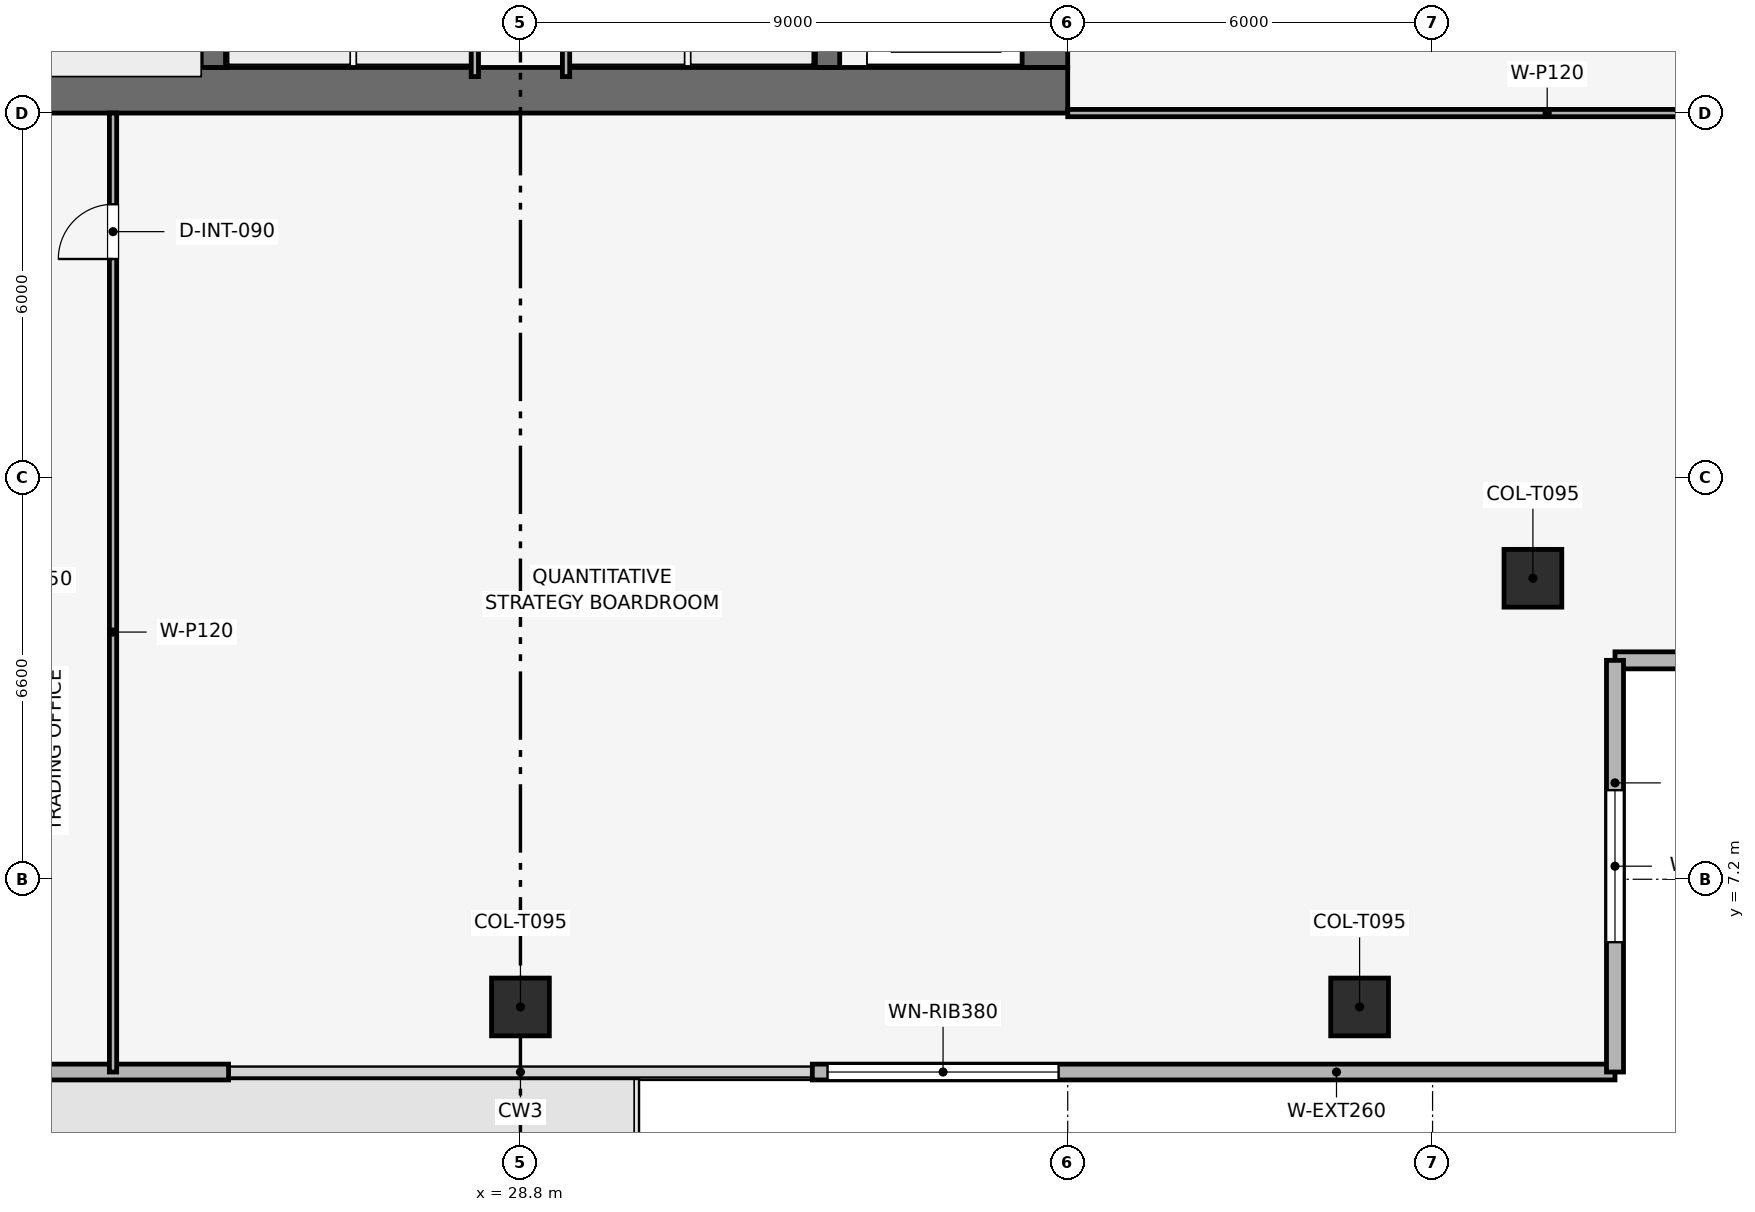
"""IFC4 building model, lengths in metres.
Left out: names, types, materials, properties, quantities, classifications, styles, units other than length and angle.
Written with IfcOpenShell. Run it as: python <this file> out.ifc"""

import sys

from ifc_helpers import new_model, si_unit, direction, frame, frame_2d, origin, origin_2d, place, context, subcontext, project, spatial, rectangle, extrude, element, fill, save


model = new_model("IFC4")
c1 = context("Model", 3, precision=1e-05, world=origin(), true_north=direction((0.0, 1.0)))
c2 = subcontext(c1, "Body", "Model", "MODEL_VIEW")
j1 = project(units=[si_unit("LENGTHUNIT", "METRE"), si_unit("PLANEANGLEUNIT", "RADIAN")], contexts=[c1])
p1 = place(None, origin())
s1 = spatial("IfcSite", under=j1, at=p1, CompositionType="ELEMENT")
p2 = place(p1, origin())
s2 = spatial("IfcBuilding", under=s1, at=p2, CompositionType="ELEMENT")
p3 = place(p2, frame((0.0, 0.0, 254.1)))
s3 = spatial("IfcBuildingStorey", under=s2, at=p3, CompositionType="ELEMENT", Elevation=254.1)
p4 = place(p3, frame((19.8, 20.175, 0.0), z_axis=(0.0, 0.0, 1.0), x_axis=(1.0, 0.0, 0.0)))
e1 = element("IfcWall", 1, at=p4, inside=s3, PredefinedType="SHEAR", context=c2, shape_type="SweptSolid", body=[
    extrude(rectangle(XDim=18.0, YDim=0.75, at=frame_2d((9.0, 0.0))), origin(), (0.0, 0.0, 1.0), 3.75),
])
p5 = place(p3, frame((37.425, 20.55, 0.0), z_axis=(0.0, 0.0, 1.0), x_axis=(0.0, 1.0, 0.0)))
e2 = element("IfcWall", 2, at=p5, inside=s3, PredefinedType="SHEAR", context=c2, shape_type="SweptSolid", body=[
    extrude(rectangle(XDim=16.5, YDim=0.75, at=frame_2d((8.25, 0.0))), origin(), (0.0, 0.0, 1.0), 3.75),
])
p6 = place(p5, frame((4.75, 0.0, 0.0)))
e3 = element("IfcOpeningElement", 3, at=p6, cuts=e2, PredefinedType="OPENING", context=c2, shape_type="SweptSolid", body=[
    extrude(rectangle(XDim=1.1, YDim=2.15, at=frame_2d((0.55, 1.075))), frame((0.0, 0.385, 0.0), z_axis=(0.0, -1.0, 0.0), x_axis=(1.0, 0.0, 0.0)), (0.0, 0.0, 1.0), 0.77),
])
for number, where, z_axis, x_axis in (
    (4, (23.75, 20.55, 0.0), (0.0, 0.0, 1.0), (0.0, 1.0, 0.0)),
    (5, (33.85, 20.55, 0.0), (0.0, 0.0, 1.0), (0.0, 1.0, 0.0)),
):
    element("IfcWall", number, at=place(p3, frame(where, z_axis=z_axis, x_axis=x_axis)), inside=s3, PredefinedType="SHEAR", context=c2, shape_type="SweptSolid", body=[
        extrude(rectangle(XDim=16.5, YDim=0.4, at=frame_2d((8.25, 0.0))), origin(), (0.0, 0.0, 1.0), 3.75),
    ])
for number, where, z_axis, x_axis in (
    (6, (28.8, 5.1, 0.003), (0.0, 0.0, 1.0), (1.0, 0.0, 0.0)),
    (7, (42.6, 5.1, 0.003), (0.0, 0.0, 1.0), (1.0, 0.0, 0.0)),
    (8, (45.45, 12.15, 0.003), (0.0, 0.0, 1.0), (1.0, 0.0, 0.0)),
):
    element("IfcColumn", number, at=place(p3, frame(where, z_axis=z_axis, x_axis=x_axis)), inside=s3, PredefinedType="COLUMN", context=c2, shape_type="SweptSolid", body=[
        extrude(rectangle(XDim=0.95, YDim=0.95, at=origin_2d()), origin(), (0.0, 0.0, 1.0), 3.494),
    ])
p7 = place(p3, frame((46.8, 4.03, 0.0), z_axis=(0.0, 0.0, 1.0), x_axis=(-1.0, 0.0, 0.0)))
e9 = element("IfcWall", 9, at=p7, inside=s3, PredefinedType="SOLIDWALL", context=c2, shape_type="SweptSolid", body=[
    extrude(rectangle(XDim=13.2, YDim=0.26, at=frame_2d((6.6, 0.0))), origin(), (0.0, 0.0, 1.0), 3.5),
])
p8 = place(p7, frame((9.15, 0.0, 0.9)))
e10 = element("IfcOpeningElement", 10, at=p8, cuts=e9, PredefinedType="OPENING", context=c2, shape_type="SweptSolid", body=[
    extrude(rectangle(XDim=3.8, YDim=1.9, at=frame_2d((1.9, 0.95))), frame((0.0, 0.14, 0.0), z_axis=(0.0, -1.0, 0.0), x_axis=(1.0, 0.0, 0.0)), (0.0, 0.0, 1.0), 0.28),
])
p9 = place(p3, frame((24.0, 4.03, 0.0), z_axis=(0.0, 0.0, 1.0), x_axis=(-1.0, 0.0, 0.0)))
e11 = element("IfcWall", 11, at=p9, inside=s3, PredefinedType="SOLIDWALL", context=c2, shape_type="SweptSolid", body=[
    extrude(rectangle(XDim=13.2, YDim=0.26, at=frame_2d((6.6, 0.0))), origin(), (0.0, 0.0, 1.0), 3.5),
])
p10 = place(p9, frame((6.083, 0.0, 0.0)))
e12 = element("IfcOpeningElement", 12, at=p10, cuts=e11, PredefinedType="OPENING", context=c2, shape_type="SweptSolid", body=[
    extrude(rectangle(XDim=1.0, YDim=2.2, at=frame_2d((0.5, 1.1))), frame((0.0, 0.14, 0.0), z_axis=(0.0, -1.0, 0.0), x_axis=(1.0, 0.0, 0.0)), (0.0, 0.0, 1.0), 0.28),
])
p11 = place(p3, frame((53.57, 10.8, 0.0), z_axis=(0.0, 0.0, 1.0), x_axis=(-1.0, 0.0, 0.0)))
e13 = element("IfcWall", 13, at=p11, inside=s3, PredefinedType="SOLIDWALL", context=c2, shape_type="SweptSolid", body=[
    extrude(rectangle(XDim=6.77, YDim=0.28, at=frame_2d((3.385, 0.0))), origin(), (0.0, 0.0, 1.0), 3.5),
])
p12 = place(p11, frame((2.135, 0.0, 0.9)))
e14 = element("IfcOpeningElement", 14, at=p12, cuts=e13, PredefinedType="OPENING", context=c2, shape_type="SweptSolid", body=[
    extrude(rectangle(XDim=2.5, YDim=1.9, at=frame_2d((1.25, 0.95))), frame((0.0, 0.15, 0.0), z_axis=(0.0, -1.0, 0.0), x_axis=(1.0, 0.0, 0.0)), (0.0, 0.0, 1.0), 0.3),
])
p13 = place(p3, frame((46.8, 10.8, 0.0), z_axis=(0.0, 0.0, 1.0), x_axis=(0.0, -1.0, 0.0)))
e15 = element("IfcWall", 15, at=p13, inside=s3, PredefinedType="SOLIDWALL", context=c2, shape_type="SweptSolid", body=[
    extrude(rectangle(XDim=6.77, YDim=0.28, at=frame_2d((3.385, 0.0))), origin(), (0.0, 0.0, 1.0), 3.5),
])
p14 = place(p13, frame((2.135, 0.0, 0.9)))
e16 = element("IfcOpeningElement", 16, at=p14, cuts=e15, PredefinedType="OPENING", context=c2, shape_type="SweptSolid", body=[
    extrude(rectangle(XDim=2.5, YDim=1.9, at=frame_2d((1.25, 0.95))), frame((0.0, 0.15, 0.0), z_axis=(0.0, -1.0, 0.0), x_axis=(1.0, 0.0, 0.0)), (0.0, 0.0, 1.0), 0.3),
])
p15 = place(p3, frame((28.05, 20.4, 0.0), z_axis=(0.0, 0.0, 1.0), x_axis=(0.0, 1.0, 0.0)))
e17 = element("IfcWall", 17, at=p15, inside=s3, PredefinedType="PARTITIONING", context=c2, shape_type="SweptSolid", body=[
    extrude(rectangle(XDim=8.15, YDim=0.12, at=frame_2d((4.075, 0.0))), origin(), (0.0, 0.0, 1.0), 3.5),
])
p16 = place(p3, frame((29.55, 20.4, 0.0), z_axis=(0.0, 0.0, 1.0), x_axis=(0.0, 1.0, 0.0)))
e18 = element("IfcWall", 18, at=p16, inside=s3, PredefinedType="PARTITIONING", context=c2, shape_type="SweptSolid", body=[
    extrude(rectangle(XDim=2.75, YDim=0.12, at=frame_2d((1.375, 0.0))), origin(), (0.0, 0.0, 1.0), 3.5),
])
p17 = place(p3, frame((22.1, 4.03, 0.0), z_axis=(0.0, 0.0, 1.0), x_axis=(0.0, 1.0, 0.0)))
e19 = element("IfcWall", 19, at=p17, inside=s3, PredefinedType="PARTITIONING", context=c2, shape_type="SweptSolid", body=[
    extrude(rectangle(XDim=15.77, YDim=0.12, at=frame_2d((7.885, 0.0))), origin(), (0.0, 0.0, 1.0), 3.085),
])
p18 = place(p17, frame((13.37, 0.0, 0.0)))
e20 = element("IfcOpeningElement", 20, at=p18, cuts=e19, PredefinedType="OPENING", context=c2, shape_type="SweptSolid", body=[
    extrude(rectangle(XDim=0.9, YDim=2.1, at=frame_2d((0.45, 1.05))), frame((0.0, 0.07, 0.0), z_axis=(0.0, -1.0, 0.0), x_axis=(1.0, 0.0, 0.0)), (0.0, 0.0, 1.0), 0.14),
])
p19 = place(p3, frame((37.8, 19.8, 0.0), z_axis=(0.0, 0.0, 1.0), x_axis=(1.0, 0.0, 0.0)))
e21 = element("IfcWall", 21, at=p19, inside=s3, PredefinedType="PARTITIONING", context=c2, shape_type="SweptSolid", body=[
    extrude(rectangle(XDim=15.77, YDim=0.12, at=frame_2d((7.885, 0.0))), origin(), (0.0, 0.0, 1.0), 3.085),
])
p20 = place(p8, origin())
e22 = element("IfcWindow", 22, at=p20, inside=s3, PartitioningType="SINGLE_PANEL", PredefinedType="WINDOW", context=c2, shape_type="SweptSolid", body=[
    extrude(rectangle(XDim=3.8, YDim=1.9, at=frame_2d((1.9, 0.95))), frame((0.0, 0.03, 0.0), z_axis=(0.0, -1.0, 0.0), x_axis=(1.0, 0.0, 0.0)), (0.0, 0.0, 1.0), 0.06),
])
fill(e10, e22)
p21 = place(p14, origin())
e23 = element("IfcWindow", 23, at=p21, inside=s3, PartitioningType="SINGLE_PANEL", PredefinedType="WINDOW", context=c2, shape_type="SweptSolid", body=[
    extrude(rectangle(XDim=2.5, YDim=1.9, at=frame_2d((1.25, 0.95))), frame((0.0, 0.03, 0.0), z_axis=(0.0, -1.0, 0.0), x_axis=(1.0, 0.0, 0.0)), (0.0, 0.0, 1.0), 0.06),
])
fill(e16, e23)
p22 = place(p18, origin())
e24 = element("IfcDoor", 24, at=p22, inside=s3, OperationType="SINGLE_SWING_LEFT", PredefinedType="DOOR", context=c2, shape_type="SweptSolid", body=[
    extrude(rectangle(XDim=0.9, YDim=2.1, at=frame_2d((0.45, 1.05))), frame((0.0, 0.025, 0.0), z_axis=(0.0, -1.0, 0.0), x_axis=(1.0, 0.0, 0.0)), (0.0, 0.0, 1.0), 0.05),
])
fill(e20, e24)
save(model, sys.argv[1])
